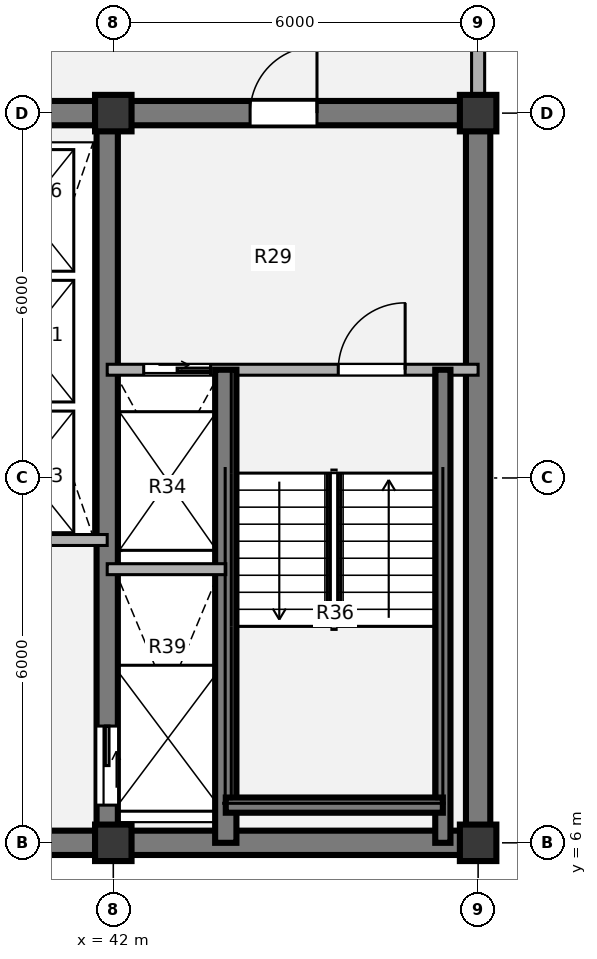
"""IFC4 building model, lengths in metres.
Left out: names, types, materials, properties, quantities, classifications, styles, units other than length and angle.
Written with IfcOpenShell. Run it as: python <this file> out.ifc"""

import sys

from ifc_helpers import new_model, si_unit, direction, frame, frame_2d, origin, origin_2d, place, context, subcontext, project, spatial, rectangle, extrude, source, transform, mapped, element, fill, save


model = new_model("IFC4")
c1 = context("Model", 3, precision=1e-05, world=origin(), true_north=direction((0.0, 1.0)))
c2 = subcontext(c1, "Body", "Model", "MODEL_VIEW")
j1 = project(units=[si_unit("LENGTHUNIT", "METRE"), si_unit("PLANEANGLEUNIT", "RADIAN")], contexts=[c1])
p1 = place(None, origin())
s1 = spatial("IfcSite", under=j1, at=p1, CompositionType="ELEMENT")
p2 = place(p1, origin())
s2 = spatial("IfcBuilding", under=s1, at=p2, CompositionType="ELEMENT")
p3 = place(p2, frame((0.0, 0.0, 226.8)))
s3 = spatial("IfcBuildingStorey", under=s2, at=p3, CompositionType="ELEMENT", Elevation=226.8)
m1 = source(origin(), c2, "Body", "SweptSolid", [
    extrude(rectangle(XDim=0.6, YDim=0.6, at=origin_2d()), origin(), (0.0, 0.0, 1.0), 3.78),
])
for number, where, z_axis, x_axis in (
    (1, (42.0, 6.0, 0.0), (0.0, 0.0, 1.0), (1.0, 0.0, 0.0)),
    (2, (48.0, 6.0, 0.0), (0.0, 0.0, 1.0), (1.0, 0.0, 0.0)),
    (3, (42.0, 18.0, 0.0), (0.0, 0.0, 1.0), (1.0, 0.0, 0.0)),
    (4, (48.0, 18.0, 0.0), (0.0, 0.0, 1.0), (1.0, 0.0, 0.0)),
):
    element("IfcColumn", number, at=place(p3, frame(where, z_axis=z_axis, x_axis=x_axis)), inside=s3, PredefinedType="COLUMN", context=c2, shape_type="MappedRepresentation", body=[
        mapped(m1, transform((0.0, 0.0, 0.0), x_axis=(1.0, 0.0, 0.0), y_axis=(0.0, 1.0, 0.0), z_axis=(0.0, 0.0, 1.0), scale=1.0)),
    ])
p4 = place(p3, frame((48.2, 6.0, 0.0), z_axis=(0.0, 0.0, 1.0), x_axis=(-1.0, 0.0, 0.0)))
e5 = element("IfcWall", 5, at=p4, inside=s3, PredefinedType="SHEAR", context=c2, shape_type="SweptSolid", body=[
    extrude(rectangle(XDim=24.4, YDim=0.4, at=frame_2d((12.2, 0.0))), origin(), (0.0, 0.0, 1.0), 3.78),
])
p5 = place(p3, frame((48.0, 18.0, 0.0), z_axis=(0.0, 0.0, 1.0), x_axis=(0.0, -1.0, 0.0)))
e6 = element("IfcWall", 6, at=p5, inside=s3, PredefinedType="SHEAR", context=c2, shape_type="SweptSolid", body=[
    extrude(rectangle(XDim=12.0, YDim=0.4, at=frame_2d((6.0, 0.0))), origin(), (0.0, 0.0, 1.0), 3.78),
])
p6 = place(p3, frame((38.8, 18.0, 0.0), z_axis=(0.0, 0.0, 1.0), x_axis=(1.0, 0.0, 0.0)))
e7 = element("IfcWall", 7, at=p6, inside=s3, PredefinedType="SHEAR", context=c2, shape_type="SweptSolid", body=[
    extrude(rectangle(XDim=9.4, YDim=0.4, at=frame_2d((4.7, 0.0))), origin(), (0.0, 0.0, 1.0), 3.78),
])
p7 = place(p6, frame((5.45, 0.0, 0.0)))
e8 = element("IfcOpeningElement", 8, at=p7, cuts=e7, PredefinedType="OPENING", context=c2, shape_type="SweptSolid", body=[
    extrude(rectangle(XDim=1.1, YDim=2.1, at=origin_2d()), frame((0.55, 0.21, 1.05), z_axis=(0.0, -1.0, 0.0), x_axis=(1.0, 0.0, 0.0)), (0.0, 0.0, 1.0), 0.42),
])
p8 = place(p3, frame((41.9, 18.0, 0.0), z_axis=(0.0, 0.0, 1.0), x_axis=(0.0, -1.0, 0.0)))
e9 = element("IfcWall", 9, at=p8, inside=s3, PredefinedType="SHEAR", context=c2, shape_type="SweptSolid", body=[
    extrude(rectangle(XDim=12.0, YDim=0.35, at=frame_2d((6.0, 0.0))), origin(), (0.0, 0.0, 1.0), 3.78),
])
p9 = place(p8, frame((10.08, 0.0, 0.0)))
e10 = element("IfcOpeningElement", 10, at=p9, cuts=e9, PredefinedType="OPENING", context=c2, shape_type="SweptSolid", body=[
    extrude(rectangle(XDim=1.3, YDim=2.1, at=origin_2d()), frame((0.65, 0.185, 1.05), z_axis=(0.0, -1.0, 0.0), x_axis=(1.0, 0.0, 0.0)), (0.0, 0.0, 1.0), 0.37),
])
p10 = place(p3, frame((48.0, 21.05, 0.0), z_axis=(0.0, 0.0, 1.0), x_axis=(0.0, -1.0, 0.0)))
e11 = element("IfcWall", 11, at=p10, inside=s3, PredefinedType="SOLIDWALL", context=c2, shape_type="SweptSolid", body=[
    extrude(rectangle(XDim=2.77, YDim=0.215, at=frame_2d((1.385, 0.0))), origin(), (0.0, 0.0, 1.0), 2.718),
])
p11 = place(p3, frame((39.35, 10.98, 0.0), z_axis=(0.0, 0.0, 1.0), x_axis=(1.0, 0.0, 0.0)))
e12 = element("IfcWall", 12, at=p11, inside=s3, PredefinedType="PARTITIONING", context=c2, shape_type="SweptSolid", body=[
    extrude(rectangle(XDim=2.55, YDim=0.18, at=frame_2d((1.275, 0.0))), origin(), (0.0, 0.0, 1.0), 3.5),
])
p12 = place(p3, frame((41.9, 13.78, 0.0), z_axis=(0.0, 0.0, 1.0), x_axis=(1.0, 0.0, 0.0)))
e13 = element("IfcWall", 13, at=p12, inside=s3, PredefinedType="PARTITIONING", context=c2, shape_type="SweptSolid", body=[
    extrude(rectangle(XDim=6.1, YDim=0.18, at=frame_2d((3.05, 0.0))), origin(), (0.0, 0.0, 1.0), 3.5),
])
p13 = place(p12, frame((0.6, 0.0, 0.0)))
e14 = element("IfcOpeningElement", 14, at=p13, cuts=e13, PredefinedType="OPENING", context=c2, shape_type="SweptSolid", body=[
    extrude(rectangle(XDim=1.1, YDim=2.1, at=origin_2d()), frame((0.55, 0.1, 1.05), z_axis=(0.0, -1.0, 0.0), x_axis=(1.0, 0.0, 0.0)), (0.0, 0.0, 1.0), 0.2),
])
p14 = place(p12, frame((3.8, 0.0, 0.0)))
e15 = element("IfcOpeningElement", 15, at=p14, cuts=e13, PredefinedType="OPENING", context=c2, shape_type="SweptSolid", body=[
    extrude(rectangle(XDim=1.1, YDim=2.1, at=origin_2d()), frame((0.55, 0.1, 1.05), z_axis=(0.0, -1.0, 0.0), x_axis=(1.0, 0.0, 0.0)), (0.0, 0.0, 1.0), 0.2),
])
p15 = place(p3, frame((43.85, 6.0, 0.0), z_axis=(0.0, 0.0, 1.0), x_axis=(0.0, 1.0, 0.0)))
e16 = element("IfcWall", 16, at=p15, inside=s3, PredefinedType="SHEAR", context=c2, shape_type="SweptSolid", body=[
    extrude(rectangle(XDim=7.78, YDim=0.35, at=frame_2d((3.89, 0.0))), origin(), (0.0, 0.0, 1.0), 3.85),
])
p16 = place(p3, frame((47.42, 6.0, 0.0), z_axis=(0.0, 0.0, 1.0), x_axis=(0.0, 1.0, 0.0)))
e17 = element("IfcWall", 17, at=p16, inside=s3, PredefinedType="SHEAR", context=c2, shape_type="SweptSolid", body=[
    extrude(rectangle(XDim=7.78, YDim=0.25, at=frame_2d((3.89, 0.0))), origin(), (0.0, 0.0, 1.0), 3.85),
])
p17 = place(p3, frame((43.85, 6.62, 0.0), z_axis=(0.0, 0.0, 1.0), x_axis=(1.0, 0.0, 0.0)))
e18 = element("IfcWall", 18, at=p17, inside=s3, PredefinedType="SHEAR", context=c2, shape_type="SweptSolid", body=[
    extrude(rectangle(XDim=3.57, YDim=0.25, at=frame_2d((1.785, 0.0))), origin(), (0.0, 0.0, 1.0), 3.85),
])
p18 = place(p3, frame((41.9, 10.5, 0.0), z_axis=(0.0, 0.0, 1.0), x_axis=(1.0, 0.0, 0.0)))
e19 = element("IfcWall", 19, at=p18, inside=s3, PredefinedType="PARTITIONING", context=c2, shape_type="SweptSolid", body=[
    extrude(rectangle(XDim=1.95, YDim=0.18, at=frame_2d((0.975, 0.0))), origin(), (0.0, 0.0, 1.0), 3.5),
])
m2 = source(origin(), c2, "Body", "SweptSolid", [
    extrude(rectangle(XDim=1.1, YDim=2.1, at=origin_2d()), frame((0.55, 0.025, 1.05), z_axis=(0.0, -1.0, 0.0), x_axis=(1.0, 0.0, 0.0)), (0.0, 0.0, 1.0), 0.05),
])
p19 = place(p13, origin())
e20 = element("IfcDoor", 20, at=p19, inside=s3, OperationType="SLIDING_TO_RIGHT", PredefinedType="DOOR", context=c2, shape_type="MappedRepresentation", body=[
    mapped(m2, transform((0.0, 0.0, 0.0), x_axis=(1.0, 0.0, 0.0), y_axis=(0.0, 1.0, 0.0), z_axis=(0.0, 0.0, 1.0), scale=1.0)),
])
fill(e14, e20)
m3 = source(origin(), c2, "Body", "SweptSolid", [
    extrude(rectangle(XDim=1.1, YDim=2.1, at=origin_2d()), frame((0.55, 0.025, 1.05), z_axis=(0.0, -1.0, 0.0), x_axis=(1.0, 0.0, 0.0)), (0.0, 0.0, 1.0), 0.05),
])
p20 = place(p14, origin())
e21 = element("IfcDoor", 21, at=p20, inside=s3, OperationType="SINGLE_SWING_RIGHT", PredefinedType="DOOR", context=c2, shape_type="MappedRepresentation", body=[
    mapped(m3, transform((0.0, 0.0, 0.0), x_axis=(1.0, 0.0, 0.0), y_axis=(0.0, 1.0, 0.0), z_axis=(0.0, 0.0, 1.0), scale=1.0)),
])
fill(e15, e21)
m4 = source(origin(), c2, "Body", "SweptSolid", [
    extrude(rectangle(XDim=1.3, YDim=2.1, at=origin_2d()), frame((0.65, 0.025, 1.05), z_axis=(0.0, -1.0, 0.0), x_axis=(1.0, 0.0, 0.0)), (0.0, 0.0, 1.0), 0.05),
])
p21 = place(p9, origin())
e22 = element("IfcDoor", 22, at=p21, inside=s3, OperationType="SLIDING_TO_LEFT", PredefinedType="DOOR", context=c2, shape_type="MappedRepresentation", body=[
    mapped(m4, transform((0.0, 0.0, 0.0), x_axis=(1.0, 0.0, 0.0), y_axis=(0.0, 1.0, 0.0), z_axis=(0.0, 0.0, 1.0), scale=1.0)),
])
fill(e10, e22)
m5 = source(origin(), c2, "Body", "SweptSolid", [
    extrude(rectangle(XDim=1.1, YDim=2.1, at=origin_2d()), frame((0.55, 0.025, 1.05), z_axis=(0.0, -1.0, 0.0), x_axis=(1.0, 0.0, 0.0)), (0.0, 0.0, 1.0), 0.05),
])
p22 = place(p7, origin())
e23 = element("IfcDoor", 23, at=p22, inside=s3, OperationType="SINGLE_SWING_RIGHT", PredefinedType="DOOR", context=c2, shape_type="MappedRepresentation", body=[
    mapped(m5, transform((0.0, 0.0, 0.0), x_axis=(1.0, 0.0, 0.0), y_axis=(0.0, 1.0, 0.0), z_axis=(0.0, 0.0, 1.0), scale=1.0)),
])
fill(e8, e23)
save(model, sys.argv[1])
